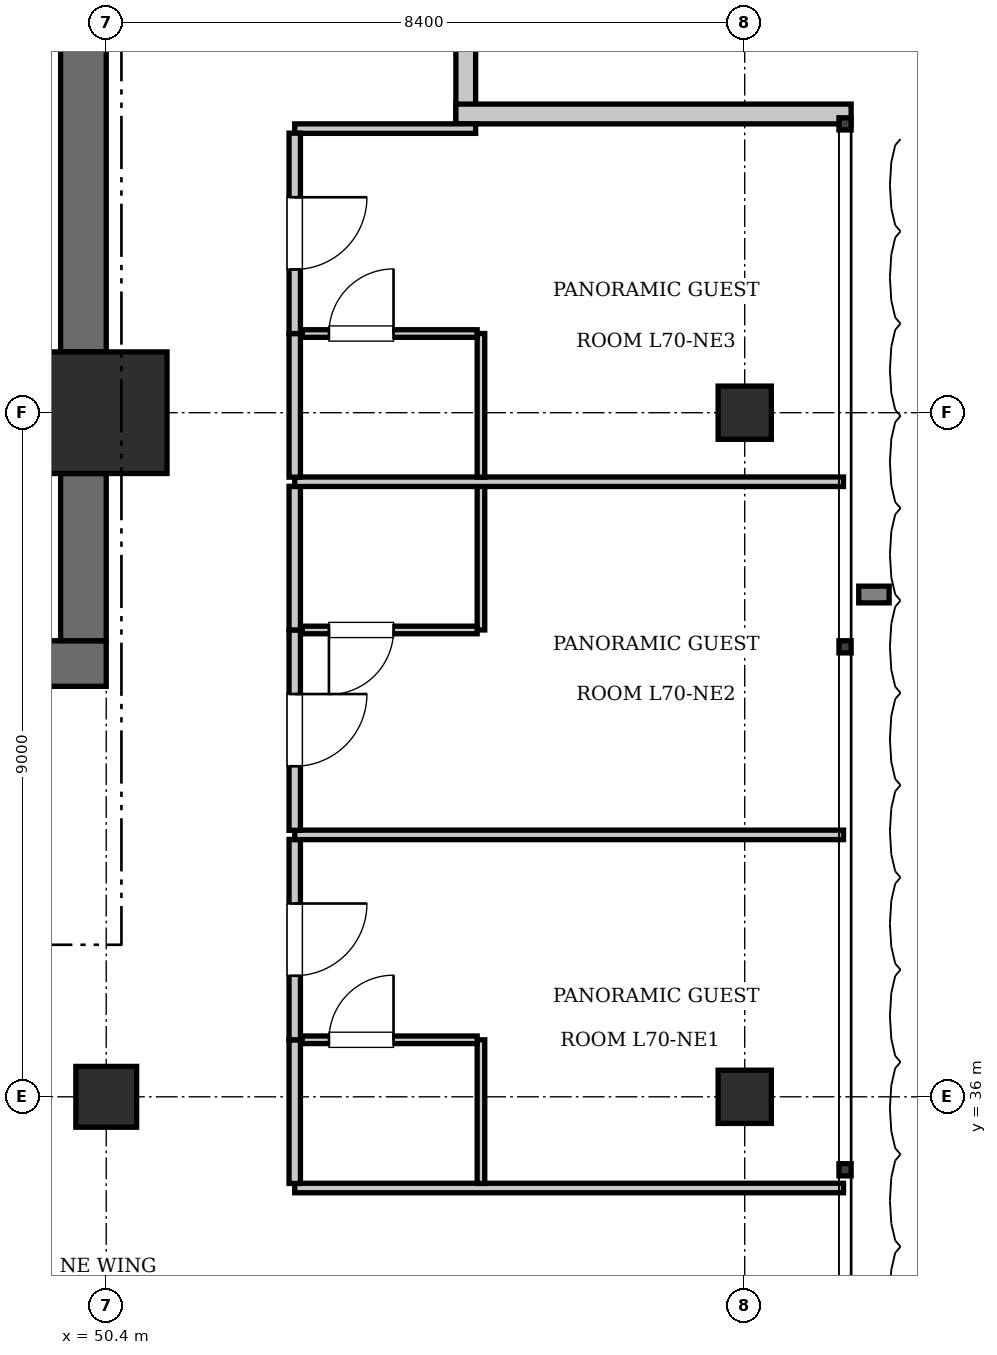
"""IFC4 building model, lengths in metres.
Left out: names, types, materials, properties, quantities, classifications, styles, units other than length and angle.
Written with IfcOpenShell. Run it as: python <this file> out.ifc"""

import sys

from ifc_helpers import new_model, si_unit, direction, frame, frame_2d, origin, origin_2d, place, context, subcontext, project, spatial, rectangle, extrude, element, fill, save


model = new_model("IFC4")
c1 = context("Model", 3, precision=1e-05, world=origin(), true_north=direction((0.0, 1.0)))
c2 = subcontext(c1, "Body", "Model", "MODEL_VIEW")
j1 = project(units=[si_unit("LENGTHUNIT", "METRE"), si_unit("PLANEANGLEUNIT", "RADIAN")], contexts=[c1])
p1 = place(None, origin())
s1 = spatial("IfcSite", under=j1, at=p1, CompositionType="ELEMENT")
p2 = place(p1, origin())
s2 = spatial("IfcBuilding", under=s1, at=p2, CompositionType="ELEMENT")
p3 = place(p2, frame((0.0, 0.0, 285.6)))
s3 = spatial("IfcBuildingStorey", under=s2, at=p3, CompositionType="ELEMENT", Elevation=285.6)
p4 = place(p3, frame((50.4, 45.0, 0.0), z_axis=(0.0, 0.0, 1.0), x_axis=(1.0, 0.0, 0.0)))
e1 = element("IfcColumn", 1, at=p4, inside=s3, PredefinedType="COLUMN", context=c2, shape_type="SweptSolid", body=[
    extrude(rectangle(XDim=1.6, YDim=1.6, at=origin_2d()), origin(), (0.0, 0.0, 1.0), 3.85),
])
p5 = place(p3, frame((43.6, 41.7, 0.0), z_axis=(0.0, 0.0, 1.0), x_axis=(1.0, 0.0, 0.0)))
e2 = element("IfcWall", 2, at=p5, inside=s3, PredefinedType="SHEAR", context=c2, shape_type="SweptSolid", body=[
    extrude(rectangle(XDim=6.8, YDim=0.6, at=frame_2d((3.4, 0.0))), origin(), (0.0, 0.0, 1.0), 3.85),
])
p6 = place(p5, frame((3.9, 0.0, 0.0)))
e3 = element("IfcOpeningElement", 3, at=p6, cuts=e2, PredefinedType="OPENING", context=c2, shape_type="SweptSolid", body=[
    extrude(rectangle(XDim=1.15, YDim=2.15, at=frame_2d((0.575, 1.075))), frame((0.0, 0.31, 0.0), z_axis=(0.0, -1.0, 0.0), x_axis=(1.0, 0.0, 0.0)), (0.0, 0.0, 1.0), 0.62),
])
p7 = place(p5, frame((0.55, 0.0, 0.0)))
e4 = element("IfcOpeningElement", 4, at=p7, cuts=e2, PredefinedType="OPENING", context=c2, shape_type="SweptSolid", body=[
    extrude(rectangle(XDim=1.1, YDim=2.2, at=frame_2d((0.55, 1.1))), frame((0.0, 0.31, 0.0), z_axis=(0.0, -1.0, 0.0), x_axis=(1.0, 0.0, 0.0)), (0.0, 0.0, 1.0), 0.62),
])
p8 = place(p3, frame((50.1, 42.0, 0.0), z_axis=(0.0, 0.0, 1.0), x_axis=(0.0, 1.0, 0.0)))
e5 = element("IfcWall", 5, at=p8, inside=s3, PredefinedType="SHEAR", context=c2, shape_type="SweptSolid", body=[
    extrude(rectangle(XDim=2.2, YDim=0.6, at=frame_2d((1.1, 0.0))), origin(), (0.0, 0.0, 1.0), 3.85),
])
p9 = place(p3, frame((50.1, 45.8, 0.0), z_axis=(0.0, 0.0, 1.0), x_axis=(0.0, 1.0, 0.0)))
e6 = element("IfcWall", 6, at=p9, inside=s3, PredefinedType="SHEAR", context=c2, shape_type="SweptSolid", body=[
    extrude(rectangle(XDim=7.6, YDim=0.6, at=frame_2d((3.8, 0.0))), origin(), (0.0, 0.0, 1.0), 3.85),
])
p10 = place(p3, frame((50.4, 36.0, 0.0), z_axis=(0.0, 0.0, 1.0), x_axis=(1.0, 0.0, 0.0)))
e7 = element("IfcColumn", 7, at=p10, inside=s3, PredefinedType="COLUMN", context=c2, shape_type="SweptSolid", body=[
    extrude(rectangle(XDim=0.8, YDim=0.8, at=origin_2d()), origin(), (0.0, 0.0, 1.0), 3.85),
])
for number, where, z_axis, x_axis in (
    (8, (58.8, 36.0, 0.0), (0.0, 0.0, 1.0), (1.0, 0.0, 0.0)),
    (9, (58.8, 45.0, 0.0), (0.0, 0.0, 1.0), (1.0, 0.0, 0.0)),
):
    element("IfcColumn", number, at=place(p3, frame(where, z_axis=z_axis, x_axis=x_axis)), inside=s3, PredefinedType="COLUMN", context=c2, shape_type="SweptSolid", body=[
        extrude(rectangle(XDim=0.7, YDim=0.7, at=origin_2d()), origin(), (0.0, 0.0, 1.0), 3.85),
    ])
for number, where, z_axis, x_axis in (
    (10, (55.13, 54.0, 0.0), (0.0, 0.0, 1.0), (0.0, -1.0, 0.0)),
    (11, (55.0, 48.93, 0.0), (0.0, 0.0, 1.0), (1.0, 0.0, 0.0)),
):
    element("IfcWall", number, at=place(p3, frame(where, z_axis=z_axis, x_axis=x_axis)), inside=s3, PredefinedType="SOLIDWALL", context=c2, shape_type="SweptSolid", body=[
        extrude(rectangle(XDim=5.2, YDim=0.26, at=frame_2d((2.6, 0.0))), origin(), (0.0, 0.0, 1.0), 3.61),
    ])
p11 = place(p3, frame((52.88, 34.8, 0.0), z_axis=(0.0, 0.0, 1.0), x_axis=(1.0, 0.0, 0.0)))
e12 = element("IfcWall", 12, at=p11, inside=s3, PredefinedType="PARTITIONING", context=c2, shape_type="SweptSolid", body=[
    extrude(rectangle(XDim=7.22, YDim=0.125, at=frame_2d((3.61, 0.0))), origin(), (0.0, 0.0, 1.0), 3.61),
])
p12 = place(p3, frame((52.88, 48.738, 0.0), z_axis=(0.0, 0.0, 1.0), x_axis=(1.0, 0.0, 0.0)))
e13 = element("IfcWall", 13, at=p12, inside=s3, PredefinedType="PARTITIONING", context=c2, shape_type="SweptSolid", body=[
    extrude(rectangle(XDim=2.38, YDim=0.125, at=frame_2d((1.19, 0.0))), origin(), (0.0, 0.0, 1.0), 3.61),
])
p13 = place(p3, frame((52.88, 34.86, 0.0), z_axis=(0.0, 0.0, 1.0), x_axis=(0.0, 1.0, 0.0)))
e14 = element("IfcWall", 14, at=p13, inside=s3, PredefinedType="PARTITIONING", context=c2, shape_type="SweptSolid", body=[
    extrude(rectangle(XDim=1.89, YDim=0.15, at=frame_2d((0.945, 0.0))), origin(), (0.0, 0.0, 1.0), 3.61),
])
p14 = place(p3, frame((52.88, 36.75, 0.0), z_axis=(0.0, 0.0, 1.0), x_axis=(0.0, 1.0, 0.0)))
e15 = element("IfcWall", 15, at=p14, inside=s3, PredefinedType="PARTITIONING", context=c2, shape_type="SweptSolid", body=[
    extrude(rectangle(XDim=2.636, YDim=0.15, at=frame_2d((1.318, 0.0))), origin(), (0.0, 0.0, 1.0), 3.61),
])
p15 = place(p14, frame((0.843, 0.0, 0.0)))
e16 = element("IfcOpeningElement", 16, at=p15, cuts=e15, PredefinedType="OPENING", context=c2, shape_type="SweptSolid", body=[
    extrude(rectangle(XDim=0.95, YDim=2.15, at=frame_2d((0.475, 1.075))), frame((0.0, 0.085, 0.0), z_axis=(0.0, -1.0, 0.0), x_axis=(1.0, 0.0, 0.0)), (0.0, 0.0, 1.0), 0.17),
])
p16 = place(p3, frame((55.33, 34.86, 0.0), z_axis=(0.0, 0.0, 1.0), x_axis=(0.0, 1.0, 0.0)))
e17 = element("IfcWall", 17, at=p16, inside=s3, PredefinedType="PARTITIONING", context=c2, shape_type="SweptSolid", body=[
    extrude(rectangle(XDim=1.89, YDim=0.1, at=frame_2d((0.945, 0.0))), origin(), (0.0, 0.0, 1.0), 3.61),
])
p17 = place(p3, frame((52.98, 36.75, 0.0), z_axis=(0.0, 0.0, 1.0), x_axis=(1.0, 0.0, 0.0)))
e18 = element("IfcWall", 18, at=p17, inside=s3, PredefinedType="PARTITIONING", context=c2, shape_type="SweptSolid", body=[
    extrude(rectangle(XDim=2.3, YDim=0.1, at=frame_2d((1.15, 0.0))), origin(), (0.0, 0.0, 1.0), 3.61),
])
p18 = place(p17, frame((0.35, 0.0, 0.0)))
e19 = element("IfcOpeningElement", 19, at=p18, cuts=e18, PredefinedType="OPENING", context=c2, shape_type="SweptSolid", body=[
    extrude(rectangle(XDim=0.85, YDim=2.1, at=frame_2d((0.425, 1.05))), frame((0.0, 0.06, 0.0), z_axis=(0.0, -1.0, 0.0), x_axis=(1.0, 0.0, 0.0)), (0.0, 0.0, 1.0), 0.12),
])
p19 = place(p3, frame((52.88, 39.446, 0.0), z_axis=(0.0, 0.0, 1.0), x_axis=(1.0, 0.0, 0.0)))
e20 = element("IfcWall", 20, at=p19, inside=s3, PredefinedType="PARTITIONING", context=c2, shape_type="SweptSolid", body=[
    extrude(rectangle(XDim=7.22, YDim=0.125, at=frame_2d((3.61, 0.0))), origin(), (0.0, 0.0, 1.0), 3.61),
])
p20 = place(p3, frame((52.88, 39.506, 0.0), z_axis=(0.0, 0.0, 1.0), x_axis=(0.0, 1.0, 0.0)))
e21 = element("IfcWall", 21, at=p20, inside=s3, PredefinedType="PARTITIONING", context=c2, shape_type="SweptSolid", body=[
    extrude(rectangle(XDim=2.636, YDim=0.15, at=frame_2d((1.318, 0.0))), origin(), (0.0, 0.0, 1.0), 3.61),
])
p21 = place(p20, frame((0.843, 0.0, 0.0)))
e22 = element("IfcOpeningElement", 22, at=p21, cuts=e21, PredefinedType="OPENING", context=c2, shape_type="SweptSolid", body=[
    extrude(rectangle(XDim=0.95, YDim=2.15, at=frame_2d((0.475, 1.075))), frame((0.0, 0.085, 0.0), z_axis=(0.0, -1.0, 0.0), x_axis=(1.0, 0.0, 0.0)), (0.0, 0.0, 1.0), 0.17),
])
p22 = place(p3, frame((52.88, 42.142, 0.0), z_axis=(0.0, 0.0, 1.0), x_axis=(0.0, 1.0, 0.0)))
e23 = element("IfcWall", 23, at=p22, inside=s3, PredefinedType="PARTITIONING", context=c2, shape_type="SweptSolid", body=[
    extrude(rectangle(XDim=1.89, YDim=0.15, at=frame_2d((0.945, 0.0))), origin(), (0.0, 0.0, 1.0), 3.61),
])
p23 = place(p3, frame((55.33, 42.142, 0.0), z_axis=(0.0, 0.0, 1.0), x_axis=(0.0, 1.0, 0.0)))
e24 = element("IfcWall", 24, at=p23, inside=s3, PredefinedType="PARTITIONING", context=c2, shape_type="SweptSolid", body=[
    extrude(rectangle(XDim=1.89, YDim=0.1, at=frame_2d((0.945, 0.0))), origin(), (0.0, 0.0, 1.0), 3.61),
])
p24 = place(p3, frame((52.98, 42.142, 0.0), z_axis=(0.0, 0.0, 1.0), x_axis=(1.0, 0.0, 0.0)))
e25 = element("IfcWall", 25, at=p24, inside=s3, PredefinedType="PARTITIONING", context=c2, shape_type="SweptSolid", body=[
    extrude(rectangle(XDim=2.3, YDim=0.1, at=frame_2d((1.15, 0.0))), origin(), (0.0, 0.0, 1.0), 3.61),
])
p25 = place(p24, frame((0.35, 0.0, 0.0)))
e26 = element("IfcOpeningElement", 26, at=p25, cuts=e25, PredefinedType="OPENING", context=c2, shape_type="SweptSolid", body=[
    extrude(rectangle(XDim=0.85, YDim=2.1, at=frame_2d((0.425, 1.05))), frame((0.0, 0.06, 0.0), z_axis=(0.0, -1.0, 0.0), x_axis=(1.0, 0.0, 0.0)), (0.0, 0.0, 1.0), 0.12),
])
p26 = place(p3, frame((52.88, 44.092, 0.0), z_axis=(0.0, 0.0, 1.0), x_axis=(1.0, 0.0, 0.0)))
e27 = element("IfcWall", 27, at=p26, inside=s3, PredefinedType="PARTITIONING", context=c2, shape_type="SweptSolid", body=[
    extrude(rectangle(XDim=7.22, YDim=0.125, at=frame_2d((3.61, 0.0))), origin(), (0.0, 0.0, 1.0), 3.61),
])
p27 = place(p3, frame((52.88, 44.152, 0.0), z_axis=(0.0, 0.0, 1.0), x_axis=(0.0, 1.0, 0.0)))
e28 = element("IfcWall", 28, at=p27, inside=s3, PredefinedType="PARTITIONING", context=c2, shape_type="SweptSolid", body=[
    extrude(rectangle(XDim=1.89, YDim=0.15, at=frame_2d((0.945, 0.0))), origin(), (0.0, 0.0, 1.0), 3.61),
])
p28 = place(p3, frame((52.88, 46.042, 0.0), z_axis=(0.0, 0.0, 1.0), x_axis=(0.0, 1.0, 0.0)))
e29 = element("IfcWall", 29, at=p28, inside=s3, PredefinedType="PARTITIONING", context=c2, shape_type="SweptSolid", body=[
    extrude(rectangle(XDim=2.636, YDim=0.15, at=frame_2d((1.318, 0.0))), origin(), (0.0, 0.0, 1.0), 3.61),
])
p29 = place(p28, frame((0.843, 0.0, 0.0)))
e30 = element("IfcOpeningElement", 30, at=p29, cuts=e29, PredefinedType="OPENING", context=c2, shape_type="SweptSolid", body=[
    extrude(rectangle(XDim=0.95, YDim=2.15, at=frame_2d((0.475, 1.075))), frame((0.0, 0.085, 0.0), z_axis=(0.0, -1.0, 0.0), x_axis=(1.0, 0.0, 0.0)), (0.0, 0.0, 1.0), 0.17),
])
p30 = place(p3, frame((55.33, 44.152, 0.0), z_axis=(0.0, 0.0, 1.0), x_axis=(0.0, 1.0, 0.0)))
e31 = element("IfcWall", 31, at=p30, inside=s3, PredefinedType="PARTITIONING", context=c2, shape_type="SweptSolid", body=[
    extrude(rectangle(XDim=1.89, YDim=0.1, at=frame_2d((0.945, 0.0))), origin(), (0.0, 0.0, 1.0), 3.61),
])
p31 = place(p3, frame((52.98, 46.042, 0.0), z_axis=(0.0, 0.0, 1.0), x_axis=(1.0, 0.0, 0.0)))
e32 = element("IfcWall", 32, at=p31, inside=s3, PredefinedType="PARTITIONING", context=c2, shape_type="SweptSolid", body=[
    extrude(rectangle(XDim=2.3, YDim=0.1, at=frame_2d((1.15, 0.0))), origin(), (0.0, 0.0, 1.0), 3.61),
])
p32 = place(p31, frame((0.35, 0.0, 0.0)))
e33 = element("IfcOpeningElement", 33, at=p32, cuts=e32, PredefinedType="OPENING", context=c2, shape_type="SweptSolid", body=[
    extrude(rectangle(XDim=0.85, YDim=2.1, at=frame_2d((0.425, 1.05))), frame((0.0, 0.06, 0.0), z_axis=(0.0, -1.0, 0.0), x_axis=(1.0, 0.0, 0.0)), (0.0, 0.0, 1.0), 0.12),
])
p33 = place(p18, origin())
e34 = element("IfcDoor", 34, at=p33, inside=s3, OperationType="SINGLE_SWING_RIGHT", PredefinedType="DOOR", context=c2, shape_type="SweptSolid", body=[
    extrude(rectangle(XDim=0.85, YDim=2.1, at=frame_2d((0.425, 1.05))), frame((0.0, 0.025, 0.0), z_axis=(0.0, -1.0, 0.0), x_axis=(1.0, 0.0, 0.0)), (0.0, 0.0, 1.0), 0.05),
])
fill(e19, e34)
p34 = place(p15, frame((0.95, 0.0, 0.0), z_axis=(0.0, 0.0, 1.0), x_axis=(-1.0, 0.0, 0.0)))
e35 = element("IfcDoor", 35, at=p34, inside=s3, OperationType="SINGLE_SWING_LEFT", PredefinedType="DOOR", context=c2, shape_type="SweptSolid", body=[
    extrude(rectangle(XDim=0.95, YDim=2.15, at=frame_2d((0.475, 1.075))), frame((0.0, 0.025, 0.0), z_axis=(0.0, -1.0, 0.0), x_axis=(1.0, 0.0, 0.0)), (0.0, 0.0, 1.0), 0.05),
])
fill(e16, e35)
p35 = place(p25, frame((0.85, 0.0, 0.0), z_axis=(0.0, 0.0, 1.0), x_axis=(-1.0, 0.0, 0.0)))
e36 = element("IfcDoor", 36, at=p35, inside=s3, OperationType="SINGLE_SWING_RIGHT", PredefinedType="DOOR", context=c2, shape_type="SweptSolid", body=[
    extrude(rectangle(XDim=0.85, YDim=2.1, at=frame_2d((0.425, 1.05))), frame((0.0, 0.025, 0.0), z_axis=(0.0, -1.0, 0.0), x_axis=(1.0, 0.0, 0.0)), (0.0, 0.0, 1.0), 0.05),
])
fill(e26, e36)
p36 = place(p21, frame((0.95, 0.0, 0.0), z_axis=(0.0, 0.0, 1.0), x_axis=(-1.0, 0.0, 0.0)))
e37 = element("IfcDoor", 37, at=p36, inside=s3, OperationType="SINGLE_SWING_LEFT", PredefinedType="DOOR", context=c2, shape_type="SweptSolid", body=[
    extrude(rectangle(XDim=0.95, YDim=2.15, at=frame_2d((0.475, 1.075))), frame((0.0, 0.025, 0.0), z_axis=(0.0, -1.0, 0.0), x_axis=(1.0, 0.0, 0.0)), (0.0, 0.0, 1.0), 0.05),
])
fill(e22, e37)
p37 = place(p32, origin())
e38 = element("IfcDoor", 38, at=p37, inside=s3, OperationType="SINGLE_SWING_RIGHT", PredefinedType="DOOR", context=c2, shape_type="SweptSolid", body=[
    extrude(rectangle(XDim=0.85, YDim=2.1, at=frame_2d((0.425, 1.05))), frame((0.0, 0.025, 0.0), z_axis=(0.0, -1.0, 0.0), x_axis=(1.0, 0.0, 0.0)), (0.0, 0.0, 1.0), 0.05),
])
fill(e33, e38)
p38 = place(p29, frame((0.95, 0.0, 0.0), z_axis=(0.0, 0.0, 1.0), x_axis=(-1.0, 0.0, 0.0)))
e39 = element("IfcDoor", 39, at=p38, inside=s3, OperationType="SINGLE_SWING_LEFT", PredefinedType="DOOR", context=c2, shape_type="SweptSolid", body=[
    extrude(rectangle(XDim=0.95, YDim=2.15, at=frame_2d((0.475, 1.075))), frame((0.0, 0.025, 0.0), z_axis=(0.0, -1.0, 0.0), x_axis=(1.0, 0.0, 0.0)), (0.0, 0.0, 1.0), 0.05),
])
fill(e30, e39)
save(model, sys.argv[1])
